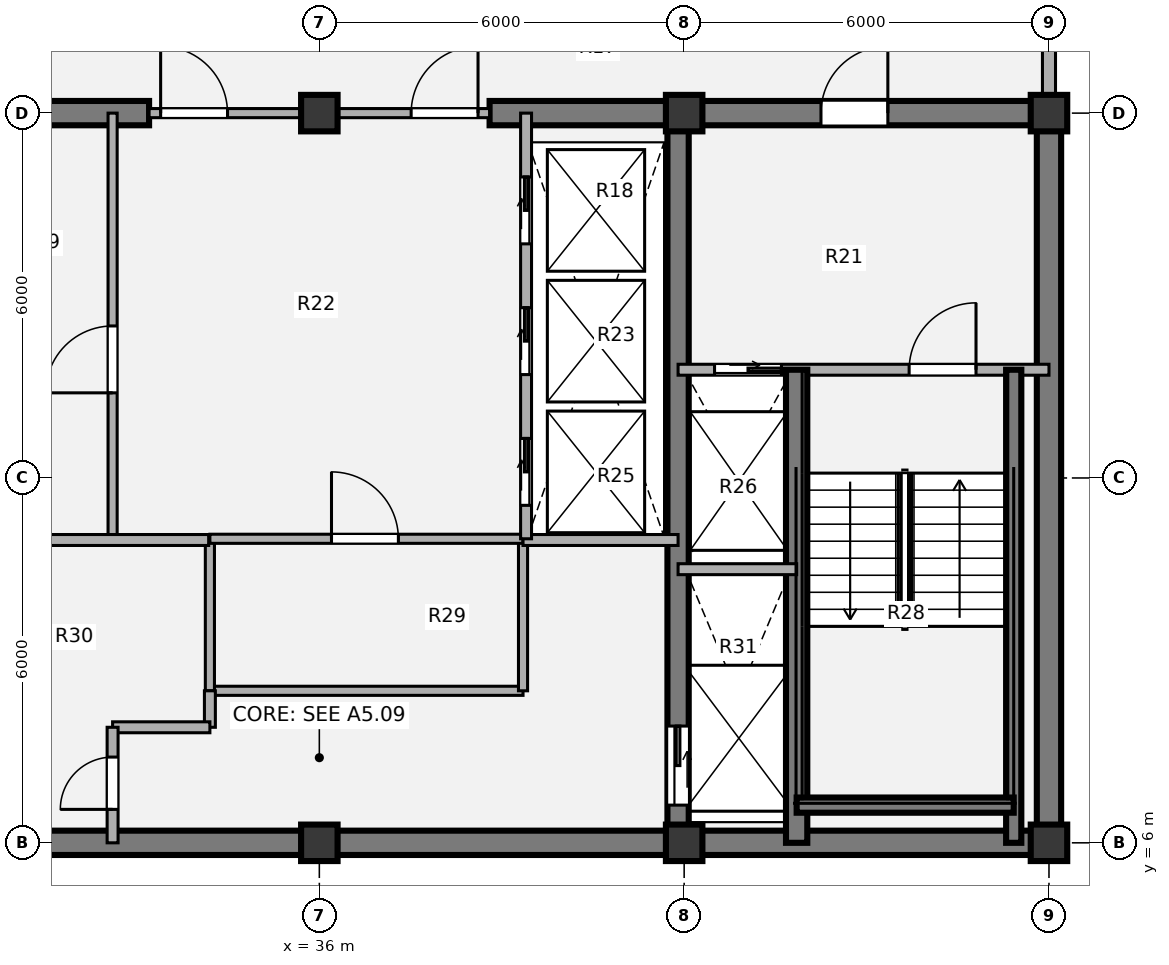
"""IFC4 building model, lengths in metres.
Left out: names, types, materials, properties, quantities, classifications, styles, units other than length and angle.
Written with IfcOpenShell. Run it as: python <this file> out.ifc"""

import sys

from ifc_helpers import new_model, si_unit, direction, frame, frame_2d, origin, origin_2d, place, context, subcontext, project, spatial, rectangle, extrude, source, transform, mapped, element, fill, save


model = new_model("IFC4")
c1 = context("Model", 3, precision=1e-05, world=origin(), true_north=direction((0.0, 1.0)))
c2 = subcontext(c1, "Body", "Model", "MODEL_VIEW")
j1 = project(units=[si_unit("LENGTHUNIT", "METRE"), si_unit("PLANEANGLEUNIT", "RADIAN")], contexts=[c1])
p1 = place(None, origin())
s1 = spatial("IfcSite", under=j1, at=p1, CompositionType="ELEMENT")
p2 = place(p1, origin())
s2 = spatial("IfcBuilding", under=s1, at=p2, CompositionType="ELEMENT")
p3 = place(p2, frame((0.0, 0.0, 249.48)))
s3 = spatial("IfcBuildingStorey", under=s2, at=p3, CompositionType="ELEMENT", Elevation=249.48)
m1 = source(origin(), c2, "Body", "SweptSolid", [
    extrude(rectangle(XDim=0.6, YDim=0.6, at=origin_2d()), origin(), (0.0, 0.0, 1.0), 3.78),
])
for number, where, z_axis, x_axis in (
    (1, (36.0, 6.0, 0.0), (0.0, 0.0, 1.0), (1.0, 0.0, 0.0)),
    (2, (42.0, 6.0, 0.0), (0.0, 0.0, 1.0), (1.0, 0.0, 0.0)),
    (3, (48.0, 6.0, 0.0), (0.0, 0.0, 1.0), (1.0, 0.0, 0.0)),
    (4, (36.0, 18.0, 0.0), (0.0, 0.0, 1.0), (1.0, 0.0, 0.0)),
    (5, (42.0, 18.0, 0.0), (0.0, 0.0, 1.0), (1.0, 0.0, 0.0)),
    (6, (48.0, 18.0, 0.0), (0.0, 0.0, 1.0), (1.0, 0.0, 0.0)),
):
    element("IfcColumn", number, at=place(p3, frame(where, z_axis=z_axis, x_axis=x_axis)), inside=s3, PredefinedType="COLUMN", context=c2, shape_type="MappedRepresentation", body=[
        mapped(m1, transform((0.0, 0.0, 0.0), x_axis=(1.0, 0.0, 0.0), y_axis=(0.0, 1.0, 0.0), z_axis=(0.0, 0.0, 1.0), scale=1.0)),
    ])
p4 = place(p3, frame((48.2, 6.0, 0.0), z_axis=(0.0, 0.0, 1.0), x_axis=(-1.0, 0.0, 0.0)))
e7 = element("IfcWall", 7, at=p4, inside=s3, PredefinedType="SHEAR", context=c2, shape_type="SweptSolid", body=[
    extrude(rectangle(XDim=24.4, YDim=0.4, at=frame_2d((12.2, 0.0))), origin(), (0.0, 0.0, 1.0), 3.78),
])
p5 = place(p3, frame((48.0, 18.0, 0.0), z_axis=(0.0, 0.0, 1.0), x_axis=(0.0, -1.0, 0.0)))
e8 = element("IfcWall", 8, at=p5, inside=s3, PredefinedType="SHEAR", context=c2, shape_type="SweptSolid", body=[
    extrude(rectangle(XDim=12.0, YDim=0.4, at=frame_2d((6.0, 0.0))), origin(), (0.0, 0.0, 1.0), 3.78),
])
p6 = place(p3, frame((23.8, 18.0, 0.0), z_axis=(0.0, 0.0, 1.0), x_axis=(1.0, 0.0, 0.0)))
e9 = element("IfcWall", 9, at=p6, inside=s3, PredefinedType="SHEAR", context=c2, shape_type="SweptSolid", body=[
    extrude(rectangle(XDim=9.4, YDim=0.4, at=frame_2d((4.7, 0.0))), origin(), (0.0, 0.0, 1.0), 3.78),
])
p7 = place(p6, frame((2.95, 0.0, 0.0)))
e10 = element("IfcOpeningElement", 10, at=p7, cuts=e9, PredefinedType="OPENING", context=c2, shape_type="SweptSolid", body=[
    extrude(rectangle(XDim=1.1, YDim=2.1, at=origin_2d()), frame((0.55, 0.21, 1.05), z_axis=(0.0, -1.0, 0.0), x_axis=(1.0, 0.0, 0.0)), (0.0, 0.0, 1.0), 0.42),
])
p8 = place(p3, frame((38.8, 18.0, 0.0), z_axis=(0.0, 0.0, 1.0), x_axis=(1.0, 0.0, 0.0)))
e11 = element("IfcWall", 11, at=p8, inside=s3, PredefinedType="SHEAR", context=c2, shape_type="SweptSolid", body=[
    extrude(rectangle(XDim=9.4, YDim=0.4, at=frame_2d((4.7, 0.0))), origin(), (0.0, 0.0, 1.0), 3.78),
])
p9 = place(p8, frame((5.45, 0.0, 0.0)))
e12 = element("IfcOpeningElement", 12, at=p9, cuts=e11, PredefinedType="OPENING", context=c2, shape_type="SweptSolid", body=[
    extrude(rectangle(XDim=1.1, YDim=2.1, at=origin_2d()), frame((0.55, 0.21, 1.05), z_axis=(0.0, -1.0, 0.0), x_axis=(1.0, 0.0, 0.0)), (0.0, 0.0, 1.0), 0.42),
])
p10 = place(p3, frame((41.9, 18.0, 0.0), z_axis=(0.0, 0.0, 1.0), x_axis=(0.0, -1.0, 0.0)))
e13 = element("IfcWall", 13, at=p10, inside=s3, PredefinedType="SHEAR", context=c2, shape_type="SweptSolid", body=[
    extrude(rectangle(XDim=12.0, YDim=0.35, at=frame_2d((6.0, 0.0))), origin(), (0.0, 0.0, 1.0), 3.78),
])
p11 = place(p10, frame((10.08, 0.0, 0.0)))
e14 = element("IfcOpeningElement", 14, at=p11, cuts=e13, PredefinedType="OPENING", context=c2, shape_type="SweptSolid", body=[
    extrude(rectangle(XDim=1.3, YDim=2.1, at=origin_2d()), frame((0.65, 0.185, 1.05), z_axis=(0.0, -1.0, 0.0), x_axis=(1.0, 0.0, 0.0)), (0.0, 0.0, 1.0), 0.37),
])
p12 = place(p3, frame((48.0, 21.05, 0.0), z_axis=(0.0, 0.0, 1.0), x_axis=(0.0, -1.0, 0.0)))
e15 = element("IfcWall", 15, at=p12, inside=s3, PredefinedType="SOLIDWALL", context=c2, shape_type="SweptSolid", body=[
    extrude(rectangle(XDim=2.77, YDim=0.215, at=frame_2d((1.385, 0.0))), origin(), (0.0, 0.0, 1.0), 2.718),
])
p13 = place(p3, frame((32.6, 11.0, 0.0), z_axis=(0.0, 0.0, 1.0), x_axis=(0.0, 1.0, 0.0)))
e16 = element("IfcWall", 16, at=p13, inside=s3, PredefinedType="PARTITIONING", context=c2, shape_type="SweptSolid", body=[
    extrude(rectangle(XDim=7.0, YDim=0.15, at=frame_2d((3.5, 0.0))), origin(), (0.0, 0.0, 1.0), 3.5),
])
p14 = place(p13, frame((2.4, 0.0, 0.0)))
e17 = element("IfcOpeningElement", 17, at=p14, cuts=e16, PredefinedType="OPENING", context=c2, shape_type="SweptSolid", body=[
    extrude(rectangle(XDim=1.1, YDim=2.1, at=origin_2d()), frame((0.55, 0.085, 1.05), z_axis=(0.0, -1.0, 0.0), x_axis=(1.0, 0.0, 0.0)), (0.0, 0.0, 1.0), 0.17),
])
p15 = place(p3, frame((34.2, 8.5, 0.0), z_axis=(0.0, 0.0, 1.0), x_axis=(1.0, 0.0, 0.0)))
e18 = element("IfcWall", 18, at=p15, inside=s3, PredefinedType="PARTITIONING", context=c2, shape_type="SweptSolid", body=[
    extrude(rectangle(XDim=5.15, YDim=0.15, at=frame_2d((2.575, 0.0))), origin(), (0.0, 0.0, 1.0), 3.5),
])
for number, where, z_axis, x_axis in (
    (19, (34.2, 8.5, 0.0), (0.0, 0.0, 1.0), (0.0, 1.0, 0.0)),
    (20, (39.35, 8.5, 0.0), (0.0, 0.0, 1.0), (0.0, 1.0, 0.0)),
):
    element("IfcWall", number, at=place(p3, frame(where, z_axis=z_axis, x_axis=x_axis)), inside=s3, PredefinedType="PARTITIONING", context=c2, shape_type="SweptSolid", body=[
        extrude(rectangle(XDim=2.5, YDim=0.15, at=frame_2d((1.25, 0.0))), origin(), (0.0, 0.0, 1.0), 3.5),
    ])
p16 = place(p3, frame((34.2, 11.0, 0.0), z_axis=(0.0, 0.0, 1.0), x_axis=(1.0, 0.0, 0.0)))
e21 = element("IfcWall", 21, at=p16, inside=s3, PredefinedType="PARTITIONING", context=c2, shape_type="SweptSolid", body=[
    extrude(rectangle(XDim=5.15, YDim=0.15, at=frame_2d((2.575, 0.0))), origin(), (0.0, 0.0, 1.0), 3.5),
])
p17 = place(p16, frame((2.0, 0.0, 0.0)))
e22 = element("IfcOpeningElement", 22, at=p17, cuts=e21, PredefinedType="OPENING", context=c2, shape_type="SweptSolid", body=[
    extrude(rectangle(XDim=1.1, YDim=2.1, at=origin_2d()), frame((0.55, 0.085, 1.05), z_axis=(0.0, -1.0, 0.0), x_axis=(1.0, 0.0, 0.0)), (0.0, 0.0, 1.0), 0.17),
])
p18 = place(p3, frame((30.1, 10.98, 0.0), z_axis=(0.0, 0.0, 1.0), x_axis=(1.0, 0.0, 0.0)))
e23 = element("IfcWall", 23, at=p18, inside=s3, PredefinedType="PARTITIONING", context=c2, shape_type="SweptSolid", body=[
    extrude(rectangle(XDim=4.08, YDim=0.18, at=frame_2d((2.04, 0.0))), origin(), (0.0, 0.0, 1.0), 3.5),
])
p19 = place(p3, frame((34.2, 7.9, 0.0), z_axis=(0.0, 0.0, 1.0), x_axis=(0.0, 1.0, 0.0)))
e24 = element("IfcWall", 24, at=p19, inside=s3, PredefinedType="PARTITIONING", context=c2, shape_type="SweptSolid", body=[
    extrude(rectangle(XDim=0.6, YDim=0.18, at=frame_2d((0.3, 0.0))), origin(), (0.0, 0.0, 1.0), 3.5),
])
p20 = place(p3, frame((32.6, 7.9, 0.0), z_axis=(0.0, 0.0, 1.0), x_axis=(1.0, 0.0, 0.0)))
e25 = element("IfcWall", 25, at=p20, inside=s3, PredefinedType="PARTITIONING", context=c2, shape_type="SweptSolid", body=[
    extrude(rectangle(XDim=1.6, YDim=0.18, at=frame_2d((0.8, 0.0))), origin(), (0.0, 0.0, 1.0), 3.5),
])
p21 = place(p3, frame((32.6, 6.0, 0.0), z_axis=(0.0, 0.0, 1.0), x_axis=(0.0, 1.0, 0.0)))
e26 = element("IfcWall", 26, at=p21, inside=s3, PredefinedType="PARTITIONING", context=c2, shape_type="SweptSolid", body=[
    extrude(rectangle(XDim=1.9, YDim=0.18, at=frame_2d((0.95, 0.0))), origin(), (0.0, 0.0, 1.0), 3.5),
])
p22 = place(p21, frame((0.55, 0.0, 0.0)))
e27 = element("IfcOpeningElement", 27, at=p22, cuts=e26, PredefinedType="OPENING", context=c2, shape_type="SweptSolid", body=[
    extrude(rectangle(XDim=0.86, YDim=2.1, at=origin_2d()), frame((0.43, 0.1, 1.05), z_axis=(0.0, -1.0, 0.0), x_axis=(1.0, 0.0, 0.0)), (0.0, 0.0, 1.0), 0.2),
])
p23 = place(p3, frame((39.35, 10.98, 0.0), z_axis=(0.0, 0.0, 1.0), x_axis=(1.0, 0.0, 0.0)))
e28 = element("IfcWall", 28, at=p23, inside=s3, PredefinedType="PARTITIONING", context=c2, shape_type="SweptSolid", body=[
    extrude(rectangle(XDim=2.55, YDim=0.18, at=frame_2d((1.275, 0.0))), origin(), (0.0, 0.0, 1.0), 3.5),
])
p24 = place(p3, frame((33.2, 18.0, 0.0), z_axis=(0.0, 0.0, 1.0), x_axis=(1.0, 0.0, 0.0)))
e29 = element("IfcWall", 29, at=p24, inside=s3, PredefinedType="PARTITIONING", context=c2, shape_type="SweptSolid", body=[
    extrude(rectangle(XDim=5.6, YDim=0.15, at=frame_2d((2.8, 0.0))), origin(), (0.0, 0.0, 1.0), 2.515),
])
p25 = place(p24, frame((0.19, 0.0, 0.0)))
e30 = element("IfcOpeningElement", 30, at=p25, cuts=e29, PredefinedType="OPENING", context=c2, shape_type="SweptSolid", body=[
    extrude(rectangle(XDim=1.1, YDim=2.1, at=origin_2d()), frame((0.55, 0.085, 1.05), z_axis=(0.0, -1.0, 0.0), x_axis=(1.0, 0.0, 0.0)), (0.0, 0.0, 1.0), 0.17),
])
p26 = place(p24, frame((4.31, 0.0, 0.0)))
e31 = element("IfcOpeningElement", 31, at=p26, cuts=e29, PredefinedType="OPENING", context=c2, shape_type="SweptSolid", body=[
    extrude(rectangle(XDim=1.1, YDim=2.1, at=origin_2d()), frame((0.55, 0.085, 1.05), z_axis=(0.0, -1.0, 0.0), x_axis=(1.0, 0.0, 0.0)), (0.0, 0.0, 1.0), 0.17),
])
p27 = place(p3, frame((41.9, 13.78, 0.0), z_axis=(0.0, 0.0, 1.0), x_axis=(1.0, 0.0, 0.0)))
e32 = element("IfcWall", 32, at=p27, inside=s3, PredefinedType="PARTITIONING", context=c2, shape_type="SweptSolid", body=[
    extrude(rectangle(XDim=6.1, YDim=0.18, at=frame_2d((3.05, 0.0))), origin(), (0.0, 0.0, 1.0), 3.5),
])
p28 = place(p27, frame((0.6, 0.0, 0.0)))
e33 = element("IfcOpeningElement", 33, at=p28, cuts=e32, PredefinedType="OPENING", context=c2, shape_type="SweptSolid", body=[
    extrude(rectangle(XDim=1.1, YDim=2.1, at=origin_2d()), frame((0.55, 0.1, 1.05), z_axis=(0.0, -1.0, 0.0), x_axis=(1.0, 0.0, 0.0)), (0.0, 0.0, 1.0), 0.2),
])
p29 = place(p27, frame((3.8, 0.0, 0.0)))
e34 = element("IfcOpeningElement", 34, at=p29, cuts=e32, PredefinedType="OPENING", context=c2, shape_type="SweptSolid", body=[
    extrude(rectangle(XDim=1.1, YDim=2.1, at=origin_2d()), frame((0.55, 0.1, 1.05), z_axis=(0.0, -1.0, 0.0), x_axis=(1.0, 0.0, 0.0)), (0.0, 0.0, 1.0), 0.2),
])
p30 = place(p3, frame((43.85, 6.0, 0.0), z_axis=(0.0, 0.0, 1.0), x_axis=(0.0, 1.0, 0.0)))
e35 = element("IfcWall", 35, at=p30, inside=s3, PredefinedType="SHEAR", context=c2, shape_type="SweptSolid", body=[
    extrude(rectangle(XDim=7.78, YDim=0.35, at=frame_2d((3.89, 0.0))), origin(), (0.0, 0.0, 1.0), 3.85),
])
p31 = place(p3, frame((47.42, 6.0, 0.0), z_axis=(0.0, 0.0, 1.0), x_axis=(0.0, 1.0, 0.0)))
e36 = element("IfcWall", 36, at=p31, inside=s3, PredefinedType="SHEAR", context=c2, shape_type="SweptSolid", body=[
    extrude(rectangle(XDim=7.78, YDim=0.25, at=frame_2d((3.89, 0.0))), origin(), (0.0, 0.0, 1.0), 3.85),
])
p32 = place(p3, frame((43.85, 6.62, 0.0), z_axis=(0.0, 0.0, 1.0), x_axis=(1.0, 0.0, 0.0)))
e37 = element("IfcWall", 37, at=p32, inside=s3, PredefinedType="SHEAR", context=c2, shape_type="SweptSolid", body=[
    extrude(rectangle(XDim=3.57, YDim=0.25, at=frame_2d((1.785, 0.0))), origin(), (0.0, 0.0, 1.0), 3.85),
])
p33 = place(p3, frame((41.9, 10.5, 0.0), z_axis=(0.0, 0.0, 1.0), x_axis=(1.0, 0.0, 0.0)))
e38 = element("IfcWall", 38, at=p33, inside=s3, PredefinedType="PARTITIONING", context=c2, shape_type="SweptSolid", body=[
    extrude(rectangle(XDim=1.95, YDim=0.18, at=frame_2d((0.975, 0.0))), origin(), (0.0, 0.0, 1.0), 3.5),
])
p34 = place(p3, frame((39.4, 11.0, 0.0), z_axis=(0.0, 0.0, 1.0), x_axis=(0.0, 1.0, 0.0)))
e39 = element("IfcWall", 39, at=p34, inside=s3, PredefinedType="PARTITIONING", context=c2, shape_type="SweptSolid", body=[
    extrude(rectangle(XDim=7.0, YDim=0.18, at=frame_2d((3.5, 0.0))), origin(), (0.0, 0.0, 1.0), 3.5),
])
p35 = place(p34, frame((0.55, 0.0, 0.0)))
e40 = element("IfcOpeningElement", 40, at=p35, cuts=e39, PredefinedType="OPENING", context=c2, shape_type="SweptSolid", body=[
    extrude(rectangle(XDim=1.1, YDim=2.1, at=origin_2d()), frame((0.55, 0.1, 1.05), z_axis=(0.0, -1.0, 0.0), x_axis=(1.0, 0.0, 0.0)), (0.0, 0.0, 1.0), 0.2),
])
p36 = place(p34, frame((2.7, 0.0, 0.0)))
e41 = element("IfcOpeningElement", 41, at=p36, cuts=e39, PredefinedType="OPENING", context=c2, shape_type="SweptSolid", body=[
    extrude(rectangle(XDim=1.1, YDim=2.1, at=origin_2d()), frame((0.55, 0.1, 1.05), z_axis=(0.0, -1.0, 0.0), x_axis=(1.0, 0.0, 0.0)), (0.0, 0.0, 1.0), 0.2),
])
p37 = place(p34, frame((4.85, 0.0, 0.0)))
e42 = element("IfcOpeningElement", 42, at=p37, cuts=e39, PredefinedType="OPENING", context=c2, shape_type="SweptSolid", body=[
    extrude(rectangle(XDim=1.1, YDim=2.1, at=origin_2d()), frame((0.55, 0.1, 1.05), z_axis=(0.0, -1.0, 0.0), x_axis=(1.0, 0.0, 0.0)), (0.0, 0.0, 1.0), 0.2),
])
m2 = source(origin(), c2, "Body", "SweptSolid", [
    extrude(rectangle(XDim=1.1, YDim=2.1, at=origin_2d()), frame((0.55, 0.025, 1.05), z_axis=(0.0, -1.0, 0.0), x_axis=(1.0, 0.0, 0.0)), (0.0, 0.0, 1.0), 0.05),
])
p38 = place(p14, origin())
e43 = element("IfcDoor", 43, at=p38, inside=s3, OperationType="SINGLE_SWING_LEFT", PredefinedType="DOOR", context=c2, shape_type="MappedRepresentation", body=[
    mapped(m2, transform((0.0, 0.0, 0.0), x_axis=(1.0, 0.0, 0.0), y_axis=(0.0, 1.0, 0.0), z_axis=(0.0, 0.0, 1.0), scale=1.0)),
])
fill(e17, e43)
p39 = place(p17, origin())
e44 = element("IfcDoor", 44, at=p39, inside=s3, OperationType="SINGLE_SWING_LEFT", PredefinedType="DOOR", context=c2, shape_type="MappedRepresentation", body=[
    mapped(m2, transform((0.0, 0.0, 0.0), x_axis=(1.0, 0.0, 0.0), y_axis=(0.0, 1.0, 0.0), z_axis=(0.0, 0.0, 1.0), scale=1.0)),
])
fill(e22, e44)
m3 = source(origin(), c2, "Body", "SweptSolid", [
    extrude(rectangle(XDim=0.86, YDim=2.1, at=origin_2d()), frame((0.43, 0.025, 1.05), z_axis=(0.0, -1.0, 0.0), x_axis=(1.0, 0.0, 0.0)), (0.0, 0.0, 1.0), 0.05),
])
p40 = place(p22, origin())
e45 = element("IfcDoor", 45, at=p40, inside=s3, OperationType="SINGLE_SWING_LEFT", PredefinedType="DOOR", context=c2, shape_type="MappedRepresentation", body=[
    mapped(m3, transform((0.0, 0.0, 0.0), x_axis=(1.0, 0.0, 0.0), y_axis=(0.0, 1.0, 0.0), z_axis=(0.0, 0.0, 1.0), scale=1.0)),
])
fill(e27, e45)
m4 = source(origin(), c2, "Body", "SweptSolid", [
    extrude(rectangle(XDim=1.1, YDim=2.1, at=origin_2d()), frame((0.55, 0.025, 1.05), z_axis=(0.0, -1.0, 0.0), x_axis=(1.0, 0.0, 0.0)), (0.0, 0.0, 1.0), 0.05),
])
p41 = place(p25, origin())
e46 = element("IfcDoor", 46, at=p41, inside=s3, OperationType="SINGLE_SWING_LEFT", PredefinedType="DOOR", context=c2, shape_type="MappedRepresentation", body=[
    mapped(m4, transform((0.0, 0.0, 0.0), x_axis=(1.0, 0.0, 0.0), y_axis=(0.0, 1.0, 0.0), z_axis=(0.0, 0.0, 1.0), scale=1.0)),
])
fill(e30, e46)
p42 = place(p26, origin())
e47 = element("IfcDoor", 47, at=p42, inside=s3, OperationType="SINGLE_SWING_RIGHT", PredefinedType="DOOR", context=c2, shape_type="MappedRepresentation", body=[
    mapped(m4, transform((0.0, 0.0, 0.0), x_axis=(1.0, 0.0, 0.0), y_axis=(0.0, 1.0, 0.0), z_axis=(0.0, 0.0, 1.0), scale=1.0)),
])
fill(e31, e47)
m5 = source(origin(), c2, "Body", "SweptSolid", [
    extrude(rectangle(XDim=1.1, YDim=2.1, at=origin_2d()), frame((0.55, 0.025, 1.05), z_axis=(0.0, -1.0, 0.0), x_axis=(1.0, 0.0, 0.0)), (0.0, 0.0, 1.0), 0.05),
])
p43 = place(p28, origin())
e48 = element("IfcDoor", 48, at=p43, inside=s3, OperationType="SLIDING_TO_RIGHT", PredefinedType="DOOR", context=c2, shape_type="MappedRepresentation", body=[
    mapped(m5, transform((0.0, 0.0, 0.0), x_axis=(1.0, 0.0, 0.0), y_axis=(0.0, 1.0, 0.0), z_axis=(0.0, 0.0, 1.0), scale=1.0)),
])
fill(e33, e48)
m6 = source(origin(), c2, "Body", "SweptSolid", [
    extrude(rectangle(XDim=1.1, YDim=2.1, at=origin_2d()), frame((0.55, 0.025, 1.05), z_axis=(0.0, -1.0, 0.0), x_axis=(1.0, 0.0, 0.0)), (0.0, 0.0, 1.0), 0.05),
])
p44 = place(p29, origin())
e49 = element("IfcDoor", 49, at=p44, inside=s3, OperationType="SINGLE_SWING_RIGHT", PredefinedType="DOOR", context=c2, shape_type="MappedRepresentation", body=[
    mapped(m6, transform((0.0, 0.0, 0.0), x_axis=(1.0, 0.0, 0.0), y_axis=(0.0, 1.0, 0.0), z_axis=(0.0, 0.0, 1.0), scale=1.0)),
])
fill(e34, e49)
m7 = source(origin(), c2, "Body", "SweptSolid", [
    extrude(rectangle(XDim=1.3, YDim=2.1, at=origin_2d()), frame((0.65, 0.025, 1.05), z_axis=(0.0, -1.0, 0.0), x_axis=(1.0, 0.0, 0.0)), (0.0, 0.0, 1.0), 0.05),
])
p45 = place(p11, origin())
e50 = element("IfcDoor", 50, at=p45, inside=s3, OperationType="SLIDING_TO_LEFT", PredefinedType="DOOR", context=c2, shape_type="MappedRepresentation", body=[
    mapped(m7, transform((0.0, 0.0, 0.0), x_axis=(1.0, 0.0, 0.0), y_axis=(0.0, 1.0, 0.0), z_axis=(0.0, 0.0, 1.0), scale=1.0)),
])
fill(e14, e50)
p46 = place(p9, origin())
e51 = element("IfcDoor", 51, at=p46, inside=s3, OperationType="SINGLE_SWING_RIGHT", PredefinedType="DOOR", context=c2, shape_type="MappedRepresentation", body=[
    mapped(m4, transform((0.0, 0.0, 0.0), x_axis=(1.0, 0.0, 0.0), y_axis=(0.0, 1.0, 0.0), z_axis=(0.0, 0.0, 1.0), scale=1.0)),
])
fill(e12, e51)
p47 = place(p35, origin())
e52 = element("IfcDoor", 52, at=p47, inside=s3, OperationType="SLIDING_TO_RIGHT", PredefinedType="DOOR", context=c2, shape_type="MappedRepresentation", body=[
    mapped(m5, transform((0.0, 0.0, 0.0), x_axis=(1.0, 0.0, 0.0), y_axis=(0.0, 1.0, 0.0), z_axis=(0.0, 0.0, 1.0), scale=1.0)),
])
fill(e40, e52)
p48 = place(p36, origin())
e53 = element("IfcDoor", 53, at=p48, inside=s3, OperationType="SLIDING_TO_RIGHT", PredefinedType="DOOR", context=c2, shape_type="MappedRepresentation", body=[
    mapped(m5, transform((0.0, 0.0, 0.0), x_axis=(1.0, 0.0, 0.0), y_axis=(0.0, 1.0, 0.0), z_axis=(0.0, 0.0, 1.0), scale=1.0)),
])
fill(e41, e53)
p49 = place(p37, origin())
e54 = element("IfcDoor", 54, at=p49, inside=s3, OperationType="SLIDING_TO_RIGHT", PredefinedType="DOOR", context=c2, shape_type="MappedRepresentation", body=[
    mapped(m5, transform((0.0, 0.0, 0.0), x_axis=(1.0, 0.0, 0.0), y_axis=(0.0, 1.0, 0.0), z_axis=(0.0, 0.0, 1.0), scale=1.0)),
])
fill(e42, e54)
save(model, sys.argv[1])
